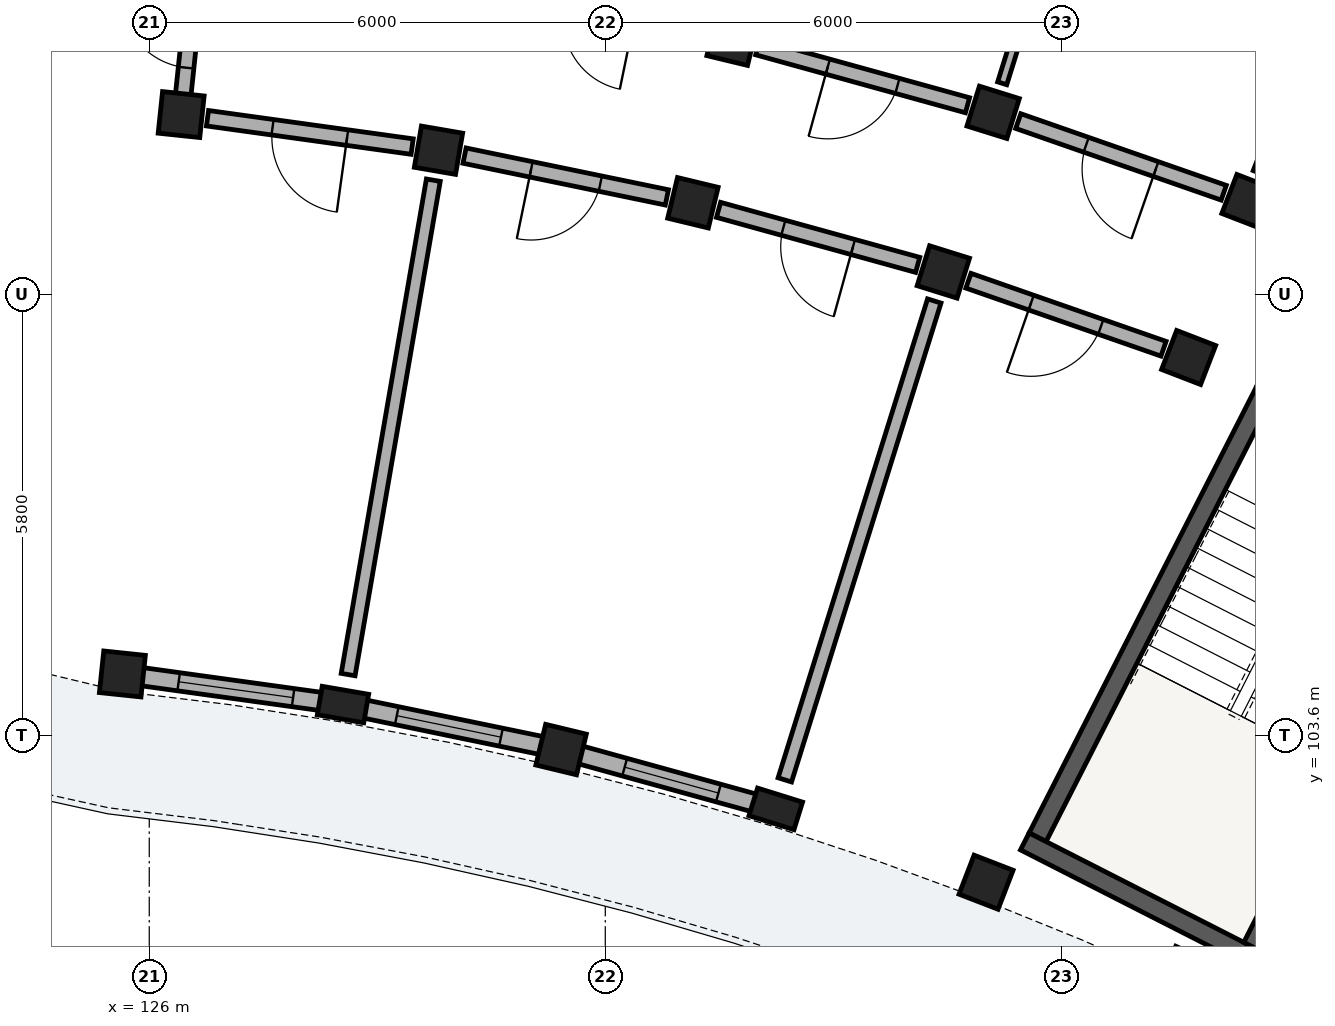
"""IFC4 building model, lengths in metres.
Left out: names, types, materials, properties, quantities, classifications, styles, units other than length and angle.
Written with IfcOpenShell. Run it as: python <this file> out.ifc"""

import sys

from ifc_helpers import new_model, si_unit, direction, frame, frame_2d, origin, origin_2d, place, context, subcontext, project, spatial, rectangle, extrude, element, fill, save


model = new_model("IFC4")
c1 = context("Model", 3, precision=1e-05, world=origin(), true_north=direction((0.0, 1.0)))
c2 = subcontext(c1, "Body", "Model", "MODEL_VIEW")
j1 = project(units=[si_unit("LENGTHUNIT", "METRE"), si_unit("PLANEANGLEUNIT", "RADIAN")], contexts=[c1])
p1 = place(None, origin())
s1 = spatial("IfcSite", under=j1, at=p1, CompositionType="ELEMENT")
p2 = place(p1, origin())
s2 = spatial("IfcBuilding", under=s1, at=p2, CompositionType="ELEMENT")
p3 = place(p2, frame((0.0, 0.0, 8.84)))
s3 = spatial("IfcBuildingStorey", under=s2, at=p3, CompositionType="ELEMENT", Elevation=8.84)
p4 = place(p3, frame((140.684, 108.139, 0.0), z_axis=(0.0, 0.0, 1.0), x_axis=(-0.453992276384, -0.891005618941, 0.0)))
e1 = element("IfcWall", 1, at=p4, inside=s3, PredefinedType="SHEAR", context=c2, shape_type="SweptSolid", body=[
    extrude(rectangle(XDim=6.6, YDim=0.25, at=frame_2d((3.3, 0.0))), origin(), (0.0, 0.0, 1.0), 3.11),
])
p5 = place(p3, frame((137.52, 102.203, 0.0), z_axis=(0.0, 0.0, 1.0), x_axis=(0.891003540237, -0.453996356025, 0.0)))
e2 = element("IfcWall", 2, at=p5, inside=s3, PredefinedType="SHEAR", context=c2, shape_type="SweptSolid", body=[
    extrude(rectangle(XDim=3.42, YDim=0.25, at=frame_2d((1.71, 0.0))), origin(), (0.0, 0.0, 1.0), 3.11),
])
p6 = place(p3, frame((143.509, 106.699, 0.0), z_axis=(0.0, 0.0, 1.0), x_axis=(-0.453992276384, -0.891005618941, 0.0)))
e3 = element("IfcWall", 3, at=p6, inside=s3, PredefinedType="SHEAR", context=c2, shape_type="SweptSolid", body=[
    extrude(rectangle(XDim=6.6, YDim=0.25, at=frame_2d((3.3, 0.0))), origin(), (0.0, 0.0, 1.0), 3.11),
])
p7 = place(p6, frame((0.22, 0.0, 0.0)))
e4 = element("IfcOpeningElement", 4, at=p7, cuts=e3, PredefinedType="OPENING", context=c2, shape_type="SweptSolid", body=[
    extrude(rectangle(XDim=1.05, YDim=2.15, at=frame_2d((0.525, 1.075))), frame((0.0, 0.135, 0.0), z_axis=(0.0, -1.0, 0.0), x_axis=(1.0, 0.0, 0.0)), (0.0, 0.0, 1.0), 0.27),
])
for number, where, z_axis, x_axis in (
    (5, (137.01, 101.667, 0.0), (0.0, 0.0, 1.0), (0.36, 0.933, 0.0)),
    (6, (139.675, 108.57, 0.0), (0.0, 0.0, 1.0), (0.36, 0.933, 0.0)),
    (7, (140.468, 110.622, 0.0), (0.0, 0.0, 1.0), (0.36, 0.933, 0.0)),
):
    element("IfcColumn", number, at=place(p3, frame(where, z_axis=z_axis, x_axis=x_axis)), inside=s3, PredefinedType="COLUMN", context=c2, shape_type="SweptSolid", body=[
        extrude(rectangle(XDim=0.55, YDim=0.55, at=origin_2d()), origin(), (0.0, 0.0, 1.0), 3.105),
    ])
p8 = place(p3, frame((134.243, 102.631, 0.0), z_axis=(0.0, 0.0, 1.0), x_axis=(0.297930225503, 0.954587649581, 0.0)))
e8 = element("IfcColumn", 8, at=p8, inside=s3, PredefinedType="PILASTER", context=c2, shape_type="SweptSolid", body=[
    extrude(rectangle(XDim=0.38, YDim=0.62, at=origin_2d()), origin(), (0.0, 0.0, 1.0), 3.105),
])
for number, where, z_axis, x_axis in (
    (9, (136.448, 109.695, 0.0), (0.0, 0.0, 1.0), (0.298, 0.955, 0.0)),
    (10, (137.103, 111.795, 0.0), (0.0, 0.0, 1.0), (0.298, 0.955, 0.0)),
    (11, (131.418, 103.412, 0.0), (0.0, 0.0, 1.0), (0.234, 0.972, 0.0)),
    (12, (133.153, 110.606, 0.0), (0.0, 0.0, 1.0), (0.234, 0.972, 0.0)),
    (13, (133.669, 112.744, 0.0), (0.0, 0.0, 1.0), (0.234, 0.972, 0.0)),
):
    element("IfcColumn", number, at=place(p3, frame(where, z_axis=z_axis, x_axis=x_axis)), inside=s3, PredefinedType="COLUMN", context=c2, shape_type="SweptSolid", body=[
        extrude(rectangle(XDim=0.55, YDim=0.55, at=origin_2d()), origin(), (0.0, 0.0, 1.0), 3.105),
    ])
p9 = place(p3, frame((128.549, 104.004, 0.0), z_axis=(0.0, 0.0, 1.0), x_axis=(0.169827230012, 0.985473851478, 0.0)))
e14 = element("IfcColumn", 14, at=p9, inside=s3, PredefinedType="PILASTER", context=c2, shape_type="SweptSolid", body=[
    extrude(rectangle(XDim=0.38, YDim=0.62, at=origin_2d()), origin(), (0.0, 0.0, 1.0), 3.105),
])
for number, where, z_axis, x_axis in (
    (15, (129.806, 111.297, 0.0), (0.0, 0.0, 1.0), (0.17, 0.985, 0.0)),
    (16, (125.646, 104.406, 0.0), (0.0, 0.0, 1.0), (0.105, 0.995, 0.0)),
    (17, (126.42, 111.766, 0.0), (0.0, 0.0, 1.0), (0.105, 0.995, 0.0)),
):
    element("IfcColumn", number, at=place(p3, frame(where, z_axis=z_axis, x_axis=x_axis)), inside=s3, PredefinedType="COLUMN", context=c2, shape_type="SweptSolid", body=[
        extrude(rectangle(XDim=0.55, YDim=0.55, at=origin_2d()), origin(), (0.0, 0.0, 1.0), 3.105),
    ])
p10 = place(p3, frame((134.089, 102.674, 0.0), z_axis=(0.0, 0.0, 1.0), x_axis=(-0.963901971286, 0.266257375017, 0.0)))
e18 = element("IfcWall", 18, at=p10, inside=s3, PredefinedType="SOLIDWALL", context=c2, shape_type="SweptSolid", body=[
    extrude(rectangle(XDim=2.525, YDim=0.24, at=frame_2d((1.263, 0.0))), origin(), (0.0, 0.0, 1.0), 2.355),
])
p11 = place(p10, frame((0.623, 0.0, 0.55)))
e19 = element("IfcOpeningElement", 19, at=p11, cuts=e18, PredefinedType="OPENING", context=c2, shape_type="SweptSolid", body=[
    extrude(rectangle(XDim=1.28, YDim=1.56, at=frame_2d((0.64, 0.78))), frame((0.0, 0.13, 0.0), z_axis=(0.0, -1.0, 0.0), x_axis=(1.0, 0.0, 0.0)), (0.0, 0.0, 1.0), 0.26),
])
p12 = place(p3, frame((131.179, 103.461, 0.0), z_axis=(0.0, 0.0, 1.0), x_axis=(-0.979353576928, 0.202154820272, 0.0)))
e20 = element("IfcWall", 20, at=p12, inside=s3, PredefinedType="SOLIDWALL", context=c2, shape_type="SweptSolid", body=[
    extrude(rectangle(XDim=2.525, YDim=0.24, at=frame_2d((1.263, 0.0))), origin(), (0.0, 0.0, 1.0), 2.355),
])
p13 = place(p12, frame((0.562, 0.0, 0.55)))
e21 = element("IfcOpeningElement", 21, at=p13, cuts=e20, PredefinedType="OPENING", context=c2, shape_type="SweptSolid", body=[
    extrude(rectangle(XDim=1.4, YDim=1.635, at=frame_2d((0.7, 0.817))), frame((0.0, 0.13, 0.0), z_axis=(0.0, -1.0, 0.0), x_axis=(1.0, 0.0, 0.0)), (0.0, 0.0, 1.0), 0.26),
])
p14 = place(p3, frame((128.39, 104.026, 0.0), z_axis=(0.0, 0.0, 1.0), x_axis=(-0.990545622952, 0.13718370476, 0.0)))
e22 = element("IfcWall", 22, at=p14, inside=s3, PredefinedType="SOLIDWALL", context=c2, shape_type="SweptSolid", body=[
    extrude(rectangle(XDim=2.525, YDim=0.24, at=frame_2d((1.263, 0.0))), origin(), (0.0, 0.0, 1.0), 2.355),
])
p15 = place(p14, frame((0.503, 0.0, 0.55)))
e23 = element("IfcOpeningElement", 23, at=p15, cuts=e22, PredefinedType="OPENING", context=c2, shape_type="SweptSolid", body=[
    extrude(rectangle(XDim=1.52, YDim=1.485, at=frame_2d((0.76, 0.743))), frame((0.0, 0.13, 0.0), z_axis=(0.0, -1.0, 0.0), x_axis=(1.0, 0.0, 0.0)), (0.0, 0.0, 1.0), 0.26),
])
p16 = place(p3, frame((140.612, 110.996, 0.0), z_axis=(0.0, 0.0, 1.0), x_axis=(0.360186633854, 0.932880264982, 0.0)))
e24 = element("IfcWall", 24, at=p16, inside=s3, PredefinedType="PARTITIONING", context=c2, shape_type="SweptSolid", body=[
    extrude(rectangle(XDim=4.7, YDim=0.185, at=frame_2d((2.35, 0.0))), origin(), (0.0, 0.0, 1.0), 2.37),
])
p17 = place(p3, frame((140.137, 110.738, 0.0), z_axis=(0.0, 0.0, 1.0), x_axis=(-0.944253820929, 0.329218349522, 0.0)))
e25 = element("IfcWall", 25, at=p17, inside=s3, PredefinedType="PARTITIONING", context=c2, shape_type="SweptSolid", body=[
    extrude(rectangle(XDim=2.863, YDim=0.205, at=frame_2d((1.432, 0.0))), origin(), (0.0, 0.0, 1.0), 2.37),
])
p18 = place(p17, frame((0.947, 0.0, 0.0)))
e26 = element("IfcOpeningElement", 26, at=p18, cuts=e25, PredefinedType="OPENING", context=c2, shape_type="SweptSolid", body=[
    extrude(rectangle(XDim=0.97, YDim=2.15, at=frame_2d((0.485, 1.075))), frame((0.0, 0.113, 0.0), z_axis=(0.0, -1.0, 0.0), x_axis=(1.0, 0.0, 0.0)), (0.0, 0.0, 1.0), 0.225),
])
p19 = place(p3, frame((139.345, 108.685, 0.0), z_axis=(0.0, 0.0, 1.0), x_axis=(-0.944265123647, 0.329185929627, 0.0)))
e27 = element("IfcWall", 27, at=p19, inside=s3, PredefinedType="PARTITIONING", context=c2, shape_type="SweptSolid", body=[
    extrude(rectangle(XDim=2.718, YDim=0.205, at=frame_2d((1.359, 0.0))), origin(), (0.0, 0.0, 1.0), 2.37),
])
p20 = place(p19, frame((0.874, 0.0, 0.0)))
e28 = element("IfcOpeningElement", 28, at=p20, cuts=e27, PredefinedType="OPENING", context=c2, shape_type="SweptSolid", body=[
    extrude(rectangle(XDim=0.97, YDim=2.15, at=frame_2d((0.485, 1.075))), frame((0.0, 0.113, 0.0), z_axis=(0.0, -1.0, 0.0), x_axis=(1.0, 0.0, 0.0)), (0.0, 0.0, 1.0), 0.225),
])
p21 = place(p3, frame((137.222, 112.177, 0.0), z_axis=(0.0, 0.0, 1.0), x_axis=(0.297905254614, 0.954595442726, 0.0)))
e29 = element("IfcWall", 29, at=p21, inside=s3, PredefinedType="PARTITIONING", context=c2, shape_type="SweptSolid", body=[
    extrude(rectangle(XDim=4.7, YDim=0.125, at=frame_2d((2.35, 0.0))), origin(), (0.0, 0.0, 1.0), 2.37),
])
p22 = place(p21, frame((1.905, 0.0, 0.0)))
e30 = element("IfcOpeningElement", 30, at=p22, cuts=e29, PredefinedType="OPENING", context=c2, shape_type="SweptSolid", body=[
    extrude(rectangle(XDim=0.89, YDim=2.1, at=frame_2d((0.445, 1.05))), frame((0.0, 0.073, 0.0), z_axis=(0.0, -1.0, 0.0), x_axis=(1.0, 0.0, 0.0)), (0.0, 0.0, 1.0), 0.145),
])
p23 = place(p3, frame((134.362, 103.013, 0.0), z_axis=(0.0, 0.0, 1.0), x_axis=(0.2979590431, 0.954578655028, 0.0)))
e31 = element("IfcWall", 31, at=p23, inside=s3, PredefinedType="PARTITIONING", context=c2, shape_type="SweptSolid", body=[
    extrude(rectangle(XDim=6.6, YDim=0.185, at=frame_2d((3.3, 0.0))), origin(), (0.0, 0.0, 1.0), 2.37),
])
p24 = place(p3, frame((136.766, 111.889, 0.0), z_axis=(0.0, 0.0, 1.0), x_axis=(-0.963890789093, 0.266297853356, 0.0)))
e32 = element("IfcWall", 32, at=p24, inside=s3, PredefinedType="PARTITIONING", context=c2, shape_type="SweptSolid", body=[
    extrude(rectangle(XDim=2.863, YDim=0.205, at=frame_2d((1.432, 0.0))), origin(), (0.0, 0.0, 1.0), 2.37),
])
p25 = place(p24, frame((0.957, 0.0, 0.0)))
e33 = element("IfcOpeningElement", 33, at=p25, cuts=e32, PredefinedType="OPENING", context=c2, shape_type="SweptSolid", body=[
    extrude(rectangle(XDim=0.95, YDim=2.13, at=frame_2d((0.475, 1.065))), frame((0.0, 0.113, 0.0), z_axis=(0.0, -1.0, 0.0), x_axis=(1.0, 0.0, 0.0)), (0.0, 0.0, 1.0), 0.225),
])
p26 = place(p3, frame((136.11, 109.789, 0.0), z_axis=(0.0, 0.0, 1.0), x_axis=(-0.96388375821, 0.266323301006, 0.0)))
e34 = element("IfcWall", 34, at=p26, inside=s3, PredefinedType="PARTITIONING", context=c2, shape_type="SweptSolid", body=[
    extrude(rectangle(XDim=2.718, YDim=0.205, at=frame_2d((1.359, 0.0))), origin(), (0.0, 0.0, 1.0), 2.37),
])
p27 = place(p26, frame((0.884, 0.0, 0.0)))
e35 = element("IfcOpeningElement", 35, at=p27, cuts=e34, PredefinedType="OPENING", context=c2, shape_type="SweptSolid", body=[
    extrude(rectangle(XDim=0.95, YDim=2.13, at=frame_2d((0.475, 1.065))), frame((0.0, 0.113, 0.0), z_axis=(0.0, -1.0, 0.0), x_axis=(1.0, 0.0, 0.0)), (0.0, 0.0, 1.0), 0.225),
])
p28 = place(p3, frame((132.81, 110.677, 0.0), z_axis=(0.0, 0.0, 1.0), x_axis=(-0.979349423541, 0.202174940608, 0.0)))
e36 = element("IfcWall", 36, at=p28, inside=s3, PredefinedType="PARTITIONING", context=c2, shape_type="SweptSolid", body=[
    extrude(rectangle(XDim=2.718, YDim=0.205, at=frame_2d((1.359, 0.0))), origin(), (0.0, 0.0, 1.0), 2.37),
])
p29 = place(p28, frame((0.894, 0.0, 0.0)))
e37 = element("IfcOpeningElement", 37, at=p29, cuts=e36, PredefinedType="OPENING", context=c2, shape_type="SweptSolid", body=[
    extrude(rectangle(XDim=0.93, YDim=2.12, at=frame_2d((0.465, 1.06))), frame((0.0, 0.113, 0.0), z_axis=(0.0, -1.0, 0.0), x_axis=(1.0, 0.0, 0.0)), (0.0, 0.0, 1.0), 0.225),
])
p30 = place(p3, frame((128.617, 104.398, 0.0), z_axis=(0.0, 0.0, 1.0), x_axis=(0.169825160084, 0.985474208187, 0.0)))
e38 = element("IfcWall", 38, at=p30, inside=s3, PredefinedType="PARTITIONING", context=c2, shape_type="SweptSolid", body=[
    extrude(rectangle(XDim=6.6, YDim=0.185, at=frame_2d((3.3, 0.0))), origin(), (0.0, 0.0, 1.0), 2.37),
])
p31 = place(p3, frame((129.459, 111.345, 0.0), z_axis=(0.0, 0.0, 1.0), x_axis=(-0.990535404475, 0.137257467855, 0.0)))
e39 = element("IfcWall", 39, at=p31, inside=s3, PredefinedType="PARTITIONING", context=c2, shape_type="SweptSolid", body=[
    extrude(rectangle(XDim=2.718, YDim=0.205, at=frame_2d((1.359, 0.0))), origin(), (0.0, 0.0, 1.0), 2.37),
])
p32 = place(p31, frame((0.864, 0.0, 0.0)))
e40 = element("IfcOpeningElement", 40, at=p32, cuts=e39, PredefinedType="OPENING", context=c2, shape_type="SweptSolid", body=[
    extrude(rectangle(XDim=0.99, YDim=2.16, at=frame_2d((0.495, 1.08))), frame((0.0, 0.113, 0.0), z_axis=(0.0, -1.0, 0.0), x_axis=(1.0, 0.0, 0.0)), (0.0, 0.0, 1.0), 0.225),
])
p33 = place(p3, frame((126.425, 111.816, 0.0), z_axis=(0.0, 0.0, 1.0), x_axis=(0.104509292252, 0.994523910136, 0.0)))
e41 = element("IfcWall", 41, at=p33, inside=s3, PredefinedType="PARTITIONING", context=c2, shape_type="SweptSolid", body=[
    extrude(rectangle(XDim=2.1, YDim=0.205, at=frame_2d((1.05, 0.0))), origin(), (0.0, 0.0, 1.0), 2.37),
])
p34 = place(p33, frame((0.57, 0.0, 0.0)))
e42 = element("IfcOpeningElement", 42, at=p34, cuts=e41, PredefinedType="OPENING", context=c2, shape_type="SweptSolid", body=[
    extrude(rectangle(XDim=0.95, YDim=2.13, at=frame_2d((0.475, 1.065))), frame((0.0, 0.113, 0.0), z_axis=(0.0, -1.0, 0.0), x_axis=(1.0, 0.0, 0.0)), (0.0, 0.0, 1.0), 0.225),
])
p35 = place(p11, origin())
e43 = element("IfcWindow", 43, at=p35, inside=s3, PartitioningType="SINGLE_PANEL", PredefinedType="WINDOW", context=c2, shape_type="SweptSolid", body=[
    extrude(rectangle(XDim=1.28, YDim=1.56, at=frame_2d((0.64, 0.78))), frame((0.0, 0.03, 0.0), z_axis=(0.0, -1.0, 0.0), x_axis=(1.0, 0.0, 0.0)), (0.0, 0.0, 1.0), 0.06),
])
fill(e19, e43)
p36 = place(p13, origin())
e44 = element("IfcWindow", 44, at=p36, inside=s3, PartitioningType="SINGLE_PANEL", PredefinedType="WINDOW", context=c2, shape_type="SweptSolid", body=[
    extrude(rectangle(XDim=1.4, YDim=1.635, at=frame_2d((0.7, 0.817))), frame((0.0, 0.03, 0.0), z_axis=(0.0, -1.0, 0.0), x_axis=(1.0, 0.0, 0.0)), (0.0, 0.0, 1.0), 0.06),
])
fill(e21, e44)
p37 = place(p15, origin())
e45 = element("IfcWindow", 45, at=p37, inside=s3, PartitioningType="SINGLE_PANEL", PredefinedType="WINDOW", context=c2, shape_type="SweptSolid", body=[
    extrude(rectangle(XDim=1.52, YDim=1.485, at=frame_2d((0.76, 0.743))), frame((0.0, 0.03, 0.0), z_axis=(0.0, -1.0, 0.0), x_axis=(1.0, 0.0, 0.0)), (0.0, 0.0, 1.0), 0.06),
])
fill(e23, e45)
p38 = place(p18, origin())
e46 = element("IfcDoor", 46, at=p38, inside=s3, OperationType="SINGLE_SWING_LEFT", PredefinedType="DOOR", context=c2, shape_type="SweptSolid", body=[
    extrude(rectangle(XDim=0.97, YDim=2.15, at=frame_2d((0.485, 1.075))), frame((0.0, 0.025, 0.0), z_axis=(0.0, -1.0, 0.0), x_axis=(1.0, 0.0, 0.0)), (0.0, 0.0, 1.0), 0.05),
])
fill(e26, e46)
p39 = place(p20, origin())
e47 = element("IfcDoor", 47, at=p39, inside=s3, OperationType="SINGLE_SWING_RIGHT", PredefinedType="DOOR", context=c2, shape_type="SweptSolid", body=[
    extrude(rectangle(XDim=0.97, YDim=2.15, at=frame_2d((0.485, 1.075))), frame((0.0, 0.025, 0.0), z_axis=(0.0, -1.0, 0.0), x_axis=(1.0, 0.0, 0.0)), (0.0, 0.0, 1.0), 0.05),
])
fill(e28, e47)
p40 = place(p25, origin())
e48 = element("IfcDoor", 48, at=p40, inside=s3, OperationType="SINGLE_SWING_RIGHT", PredefinedType="DOOR", context=c2, shape_type="SweptSolid", body=[
    extrude(rectangle(XDim=0.95, YDim=2.13, at=frame_2d((0.475, 1.065))), frame((0.0, 0.025, 0.0), z_axis=(0.0, -1.0, 0.0), x_axis=(1.0, 0.0, 0.0)), (0.0, 0.0, 1.0), 0.05),
])
fill(e33, e48)
p41 = place(p27, origin())
e49 = element("IfcDoor", 49, at=p41, inside=s3, OperationType="SINGLE_SWING_LEFT", PredefinedType="DOOR", context=c2, shape_type="SweptSolid", body=[
    extrude(rectangle(XDim=0.95, YDim=2.13, at=frame_2d((0.475, 1.065))), frame((0.0, 0.025, 0.0), z_axis=(0.0, -1.0, 0.0), x_axis=(1.0, 0.0, 0.0)), (0.0, 0.0, 1.0), 0.05),
])
fill(e35, e49)
p42 = place(p29, origin())
e50 = element("IfcDoor", 50, at=p42, inside=s3, OperationType="SINGLE_SWING_RIGHT", PredefinedType="DOOR", context=c2, shape_type="SweptSolid", body=[
    extrude(rectangle(XDim=0.93, YDim=2.12, at=frame_2d((0.465, 1.06))), frame((0.0, 0.025, 0.0), z_axis=(0.0, -1.0, 0.0), x_axis=(1.0, 0.0, 0.0)), (0.0, 0.0, 1.0), 0.05),
])
fill(e37, e50)
p43 = place(p32, origin())
e51 = element("IfcDoor", 51, at=p43, inside=s3, OperationType="SINGLE_SWING_LEFT", PredefinedType="DOOR", context=c2, shape_type="SweptSolid", body=[
    extrude(rectangle(XDim=0.99, YDim=2.16, at=frame_2d((0.495, 1.08))), frame((0.0, 0.025, 0.0), z_axis=(0.0, -1.0, 0.0), x_axis=(1.0, 0.0, 0.0)), (0.0, 0.0, 1.0), 0.05),
])
fill(e40, e51)
p44 = place(p34, origin())
e52 = element("IfcDoor", 52, at=p44, inside=s3, OperationType="SINGLE_SWING_RIGHT", PredefinedType="DOOR", context=c2, shape_type="SweptSolid", body=[
    extrude(rectangle(XDim=0.95, YDim=2.13, at=frame_2d((0.475, 1.065))), frame((0.0, 0.025, 0.0), z_axis=(0.0, -1.0, 0.0), x_axis=(1.0, 0.0, 0.0)), (0.0, 0.0, 1.0), 0.05),
])
fill(e42, e52)
save(model, sys.argv[1])
